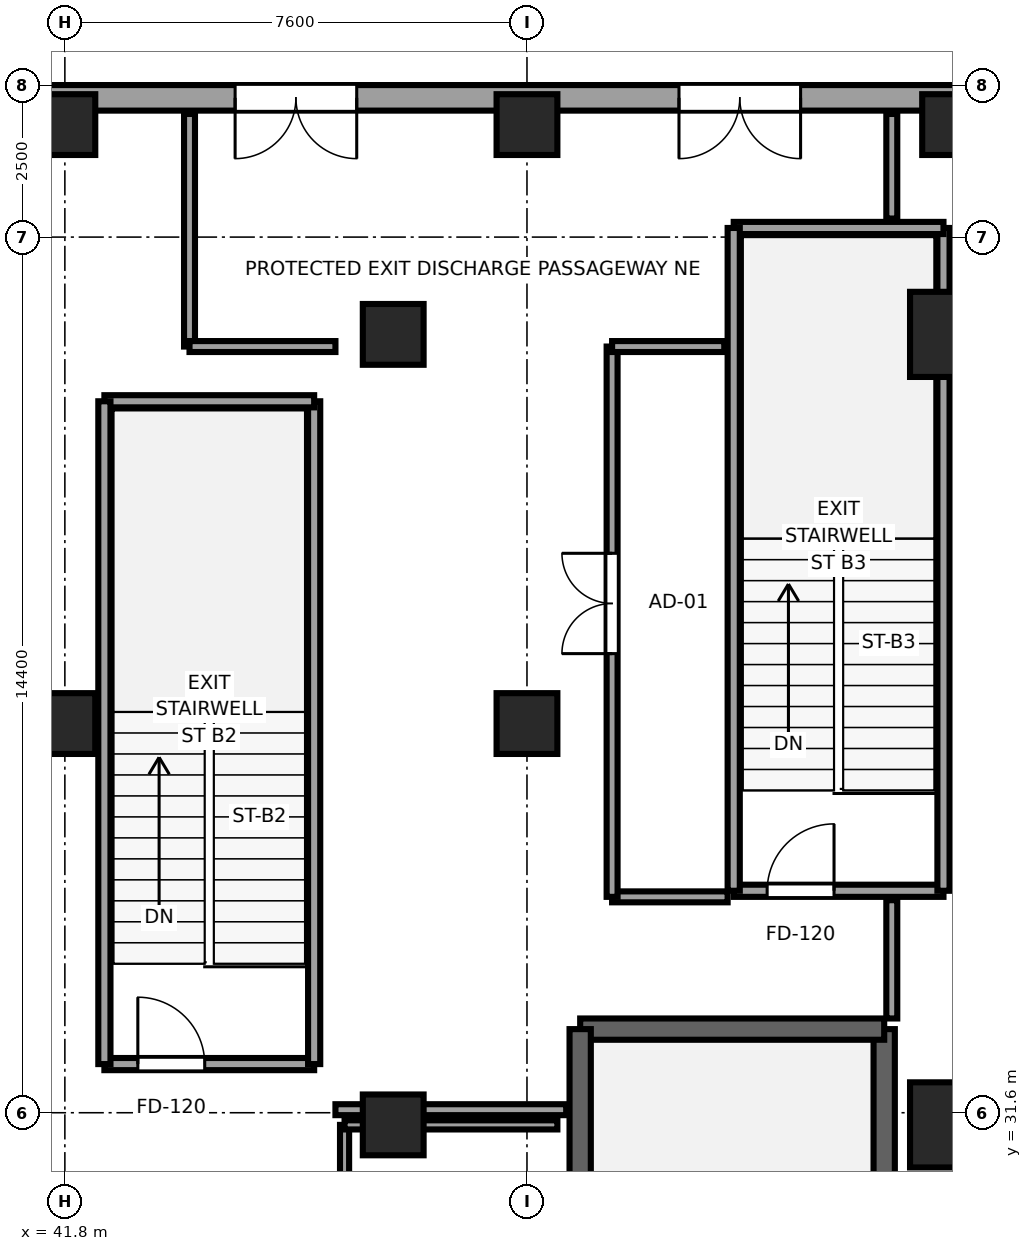
"""IFC4 building model, lengths in metres.
Left out: names, types, materials, properties, quantities, classifications, styles, units other than length and angle.
Written with IfcOpenShell. Run it as: python <this file> out.ifc"""

import sys

from ifc_helpers import new_model, si_unit, direction, frame, frame_2d, origin, origin_2d, place, context, subcontext, project, spatial, rectangle, extrude, source, transform, mapped, element, fill, save


model = new_model("IFC4")
c1 = context("Model", 3, precision=1e-05, world=origin(), true_north=direction((0.0, 1.0)))
c2 = subcontext(c1, "Body", "Model", "MODEL_VIEW")
j1 = project(units=[si_unit("LENGTHUNIT", "METRE"), si_unit("PLANEANGLEUNIT", "RADIAN")], contexts=[c1])
p1 = place(None, origin())
s1 = spatial("IfcSite", under=j1, at=p1, CompositionType="ELEMENT")
p2 = place(p1, origin())
s2 = spatial("IfcBuilding", under=s1, at=p2, CompositionType="ELEMENT")
p3 = place(p2, origin())
s3 = spatial("IfcBuildingStorey", under=s2, at=p3, CompositionType="ELEMENT", Elevation=0.0)
p4 = place(p3, frame((55.275, 20.025, 0.0), z_axis=(0.0, 0.0, 1.0), x_axis=(0.0, 1.0, 0.0)))
e1 = element("IfcWall", 1, at=p4, inside=s3, PredefinedType="SHEAR", context=c2, shape_type="SweptSolid", body=[
    extrude(rectangle(XDim=12.95, YDim=0.35, at=frame_2d((6.475, 0.0))), origin(), (0.0, 0.0, 1.0), 6.0),
])
p5 = place(p3, frame((55.275, 32.975, 0.0), z_axis=(0.0, 0.0, 1.0), x_axis=(-1.0, 0.0, 0.0)))
e2 = element("IfcWall", 2, at=p5, inside=s3, PredefinedType="SHEAR", context=c2, shape_type="SweptSolid", body=[
    extrude(rectangle(XDim=5.0, YDim=0.35, at=frame_2d((2.5, 0.0))), origin(), (0.0, 0.0, 1.0), 6.0),
])
p6 = place(p3, frame((50.275, 32.975, 0.0), z_axis=(0.0, 0.0, 1.0), x_axis=(0.0, -1.0, 0.0)))
e3 = element("IfcWall", 3, at=p6, inside=s3, PredefinedType="SHEAR", context=c2, shape_type="SweptSolid", body=[
    extrude(rectangle(XDim=12.95, YDim=0.35, at=frame_2d((6.475, 0.0))), origin(), (0.0, 0.0, 1.0), 6.0),
])
m1 = source(origin(), c2, "Body", "SweptSolid", [
    extrude(rectangle(XDim=1.0, YDim=1.0, at=origin_2d()), origin(), (0.0, 0.0, 1.0), 6.0),
])
p7 = place(p3, frame((47.2, 31.4, 0.0), z_axis=(0.0, 0.0, 1.0), x_axis=(1.0, 0.0, 0.0)))
e4 = element("IfcColumn", 4, at=p7, inside=s3, PredefinedType="COLUMN", context=c2, shape_type="MappedRepresentation", body=[
    mapped(m1, transform((0.0, 0.0, 0.0), x_axis=(1.0, 0.0, 0.0), y_axis=(0.0, 1.0, 0.0), z_axis=(0.0, 0.0, 1.0), scale=1.0)),
])
m2 = source(origin(), c2, "Body", "SweptSolid", [
    extrude(rectangle(XDim=1.4, YDim=1.4, at=origin_2d()), origin(), (0.0, 0.0, 1.0), 6.0),
])
p8 = place(p3, frame((56.4, 31.4, 0.0), z_axis=(0.0, 0.0, 1.0), x_axis=(1.0, 0.0, 0.0)))
e5 = element("IfcColumn", 5, at=p8, inside=s3, PredefinedType="COLUMN", context=c2, shape_type="MappedRepresentation", body=[
    mapped(m2, transform((0.0, 0.0, 0.0), x_axis=(1.0, 0.0, 0.0), y_axis=(0.0, 1.0, 0.0), z_axis=(0.0, 0.0, 1.0), scale=1.0)),
])
p9 = place(p3, frame((47.2, 44.4, 0.0), z_axis=(0.0, 0.0, 1.0), x_axis=(1.0, 0.0, 0.0)))
e6 = element("IfcColumn", 6, at=p9, inside=s3, PredefinedType="COLUMN", context=c2, shape_type="MappedRepresentation", body=[
    mapped(m1, transform((0.0, 0.0, 0.0), x_axis=(1.0, 0.0, 0.0), y_axis=(0.0, 1.0, 0.0), z_axis=(0.0, 0.0, 1.0), scale=1.0)),
])
p10 = place(p3, frame((56.4, 44.4, 0.0), z_axis=(0.0, 0.0, 1.0), x_axis=(1.0, 0.0, 0.0)))
e7 = element("IfcColumn", 7, at=p10, inside=s3, PredefinedType="COLUMN", context=c2, shape_type="MappedRepresentation", body=[
    mapped(m2, transform((0.0, 0.0, 0.0), x_axis=(1.0, 0.0, 0.0), y_axis=(0.0, 1.0, 0.0), z_axis=(0.0, 0.0, 1.0), scale=1.0)),
])
for number, where, z_axis, x_axis in (
    (8, (41.8, 47.85, 0.0), (0.0, 0.0, 1.0), (1.0, 0.0, 0.0)),
    (9, (49.4, 47.85, 0.0), (0.0, 0.0, 1.0), (1.0, 0.0, 0.0)),
    (10, (56.4, 47.85, 0.0), (0.0, 0.0, 1.0), (1.0, 0.0, 0.0)),
    (11, (41.8, 38.0, 0.0), (0.0, 0.0, 1.0), (1.0, 0.0, 0.0)),
    (12, (49.4, 38.0, 0.0), (0.0, 0.0, 1.0), (1.0, 0.0, 0.0)),
):
    element("IfcColumn", number, at=place(p3, frame(where, z_axis=z_axis, x_axis=x_axis)), inside=s3, PredefinedType="COLUMN", context=c2, shape_type="MappedRepresentation", body=[
        mapped(m1, transform((0.0, 0.0, 0.0), x_axis=(1.0, 0.0, 0.0), y_axis=(0.0, 1.0, 0.0), z_axis=(0.0, 0.0, 1.0), scale=1.0)),
    ])
p11 = place(p3, frame((65.19, 48.29, 0.0), z_axis=(0.0, 0.0, 1.0), x_axis=(-1.0, 0.0, 0.0)))
e13 = element("IfcWall", 13, at=p11, inside=s3, PredefinedType="SOLIDWALL", context=c2, shape_type="SweptSolid", body=[
    extrude(rectangle(XDim=73.38, YDim=0.42, at=frame_2d((36.69, 0.0))), origin(), (0.0, 0.0, 1.0), 5.74),
])
p12 = place(p11, frame((7.84, 0.0, 0.0), z_axis=(0.0, 0.0, 1.0), x_axis=(-1.0, 0.0, 0.0)))
e14 = element("IfcOpeningElement", 14, at=p12, cuts=e13, PredefinedType="OPENING", context=c2, shape_type="SweptSolid", body=[
    extrude(rectangle(XDim=6.4, YDim=3.2, at=frame_2d((3.2, 1.6))), frame((0.0, 0.22, 0.0), z_axis=(0.0, -1.0, 0.0), x_axis=(1.0, 0.0, 0.0)), (0.0, 0.0, 1.0), 0.44),
])
p13 = place(p11, frame((13.29, 0.0, 0.0), z_axis=(0.0, 0.0, 1.0), x_axis=(-1.0, 0.0, 0.0)))
e15 = element("IfcOpeningElement", 15, at=p13, cuts=e13, PredefinedType="OPENING", context=c2, shape_type="SweptSolid", body=[
    extrude(rectangle(XDim=2.0, YDim=2.25, at=frame_2d((1.0, 1.125))), frame((0.0, 0.22, 0.0), z_axis=(0.0, -1.0, 0.0), x_axis=(1.0, 0.0, 0.0)), (0.0, 0.0, 1.0), 0.44),
])
p14 = place(p11, frame((20.59, 0.0, 0.0), z_axis=(0.0, 0.0, 1.0), x_axis=(-1.0, 0.0, 0.0)))
e16 = element("IfcOpeningElement", 16, at=p14, cuts=e13, PredefinedType="OPENING", context=c2, shape_type="SweptSolid", body=[
    extrude(rectangle(XDim=2.0, YDim=2.25, at=frame_2d((1.0, 1.125))), frame((0.0, 0.22, 0.0), z_axis=(0.0, -1.0, 0.0), x_axis=(1.0, 0.0, 0.0)), (0.0, 0.0, 1.0), 0.44),
])
p15 = place(p11, frame((51.99, 0.0, 0.0), z_axis=(0.0, 0.0, 1.0), x_axis=(-1.0, 0.0, 0.0)))
e17 = element("IfcOpeningElement", 17, at=p15, cuts=e13, PredefinedType="OPENING", context=c2, shape_type="SweptSolid", body=[
    extrude(rectangle(XDim=2.0, YDim=2.25, at=frame_2d((1.0, 1.125))), frame((0.0, 0.22, 0.0), z_axis=(0.0, -1.0, 0.0), x_axis=(1.0, 0.0, 0.0)), (0.0, 0.0, 1.0), 0.44),
])
p16 = place(p11, frame((69.99, 0.0, 0.0), z_axis=(0.0, 0.0, 1.0), x_axis=(-1.0, 0.0, 0.0)))
e18 = element("IfcOpeningElement", 18, at=p16, cuts=e13, PredefinedType="OPENING", context=c2, shape_type="SweptSolid", body=[
    extrude(rectangle(XDim=2.0, YDim=2.25, at=frame_2d((1.0, 1.125))), frame((0.0, 0.22, 0.0), z_axis=(0.0, -1.0, 0.0), x_axis=(1.0, 0.0, 0.0)), (0.0, 0.0, 1.0), 0.44),
])
p17 = place(p11, frame((24.462, 0.0, 0.65)))
e19 = element("IfcOpeningElement", 19, at=p17, cuts=e13, PredefinedType="OPENING", context=c2, shape_type="SweptSolid", body=[
    extrude(rectangle(XDim=3.0, YDim=2.5, at=frame_2d((1.5, 1.25))), frame((0.0, 0.22, 0.0), z_axis=(0.0, -1.0, 0.0), x_axis=(1.0, 0.0, 0.0)), (0.0, 0.0, 1.0), 0.44),
])
p18 = place(p11, frame((28.423, 0.0, 0.65)))
e20 = element("IfcOpeningElement", 20, at=p18, cuts=e13, PredefinedType="OPENING", context=c2, shape_type="SweptSolid", body=[
    extrude(rectangle(XDim=3.0, YDim=2.5, at=frame_2d((1.5, 1.25))), frame((0.0, 0.22, 0.0), z_axis=(0.0, -1.0, 0.0), x_axis=(1.0, 0.0, 0.0)), (0.0, 0.0, 1.0), 0.44),
])
p19 = place(p11, frame((32.934, 0.0, 0.65)))
e21 = element("IfcOpeningElement", 21, at=p19, cuts=e13, PredefinedType="OPENING", context=c2, shape_type="SweptSolid", body=[
    extrude(rectangle(XDim=3.0, YDim=2.5, at=frame_2d((1.5, 1.25))), frame((0.0, 0.22, 0.0), z_axis=(0.0, -1.0, 0.0), x_axis=(1.0, 0.0, 0.0)), (0.0, 0.0, 1.0), 0.44),
])
p20 = place(p11, frame((37.446, 0.0, 0.65)))
e22 = element("IfcOpeningElement", 22, at=p20, cuts=e13, PredefinedType="OPENING", context=c2, shape_type="SweptSolid", body=[
    extrude(rectangle(XDim=3.0, YDim=2.5, at=frame_2d((1.5, 1.25))), frame((0.0, 0.22, 0.0), z_axis=(0.0, -1.0, 0.0), x_axis=(1.0, 0.0, 0.0)), (0.0, 0.0, 1.0), 0.44),
])
p21 = place(p11, frame((41.957, 0.0, 0.65)))
e23 = element("IfcOpeningElement", 23, at=p21, cuts=e13, PredefinedType="OPENING", context=c2, shape_type="SweptSolid", body=[
    extrude(rectangle(XDim=3.0, YDim=2.5, at=frame_2d((1.5, 1.25))), frame((0.0, 0.22, 0.0), z_axis=(0.0, -1.0, 0.0), x_axis=(1.0, 0.0, 0.0)), (0.0, 0.0, 1.0), 0.44),
])
p22 = place(p3, frame((42.45, 32.4, 0.0), z_axis=(0.0, 0.0, 1.0), x_axis=(1.0, 0.0, 0.0)))
e24 = element("IfcWall", 24, at=p22, inside=s3, PredefinedType="SOLIDWALL", context=c2, shape_type="SweptSolid", body=[
    extrude(rectangle(XDim=3.45, YDim=0.2, at=frame_2d((1.725, 0.0))), origin(), (0.0, 0.0, 1.0), 5.74),
])
p23 = place(p22, frame((1.65, 0.0, 0.0), z_axis=(0.0, 0.0, 1.0), x_axis=(-1.0, 0.0, 0.0)))
e25 = element("IfcOpeningElement", 25, at=p23, cuts=e24, PredefinedType="OPENING", context=c2, shape_type="SweptSolid", body=[
    extrude(rectangle(XDim=1.1, YDim=2.12, at=frame_2d((0.55, 1.06))), frame((0.0, 0.11, 0.0), z_axis=(0.0, -1.0, 0.0), x_axis=(1.0, 0.0, 0.0)), (0.0, 0.0, 1.0), 0.22),
])
p24 = place(p3, frame((45.9, 32.4, 0.0), z_axis=(0.0, 0.0, 1.0), x_axis=(0.0, 1.0, 0.0)))
e26 = element("IfcWall", 26, at=p24, inside=s3, PredefinedType="SOLIDWALL", context=c2, shape_type="SweptSolid", body=[
    extrude(rectangle(XDim=10.9, YDim=0.2, at=frame_2d((5.45, 0.0))), origin(), (0.0, 0.0, 1.0), 5.74),
])
p25 = place(p3, frame((45.9, 43.3, 0.0), z_axis=(0.0, 0.0, 1.0), x_axis=(-1.0, 0.0, 0.0)))
e27 = element("IfcWall", 27, at=p25, inside=s3, PredefinedType="SOLIDWALL", context=c2, shape_type="SweptSolid", body=[
    extrude(rectangle(XDim=3.45, YDim=0.2, at=frame_2d((1.725, 0.0))), origin(), (0.0, 0.0, 1.0), 5.74),
])
p26 = place(p3, frame((42.45, 43.3, 0.0), z_axis=(0.0, 0.0, 1.0), x_axis=(0.0, -1.0, 0.0)))
e28 = element("IfcWall", 28, at=p26, inside=s3, PredefinedType="SOLIDWALL", context=c2, shape_type="SweptSolid", body=[
    extrude(rectangle(XDim=10.9, YDim=0.2, at=frame_2d((5.45, 0.0))), origin(), (0.0, 0.0, 1.0), 5.74),
])
p27 = place(p3, frame((52.8, 35.25, 0.0), z_axis=(0.0, 0.0, 1.0), x_axis=(1.0, 0.0, 0.0)))
e29 = element("IfcWall", 29, at=p27, inside=s3, PredefinedType="SOLIDWALL", context=c2, shape_type="SweptSolid", body=[
    extrude(rectangle(XDim=3.45, YDim=0.2, at=frame_2d((1.725, 0.0))), origin(), (0.0, 0.0, 1.0), 5.74),
])
p28 = place(p27, frame((1.65, 0.0, 0.0), z_axis=(0.0, 0.0, 1.0), x_axis=(-1.0, 0.0, 0.0)))
e30 = element("IfcOpeningElement", 30, at=p28, cuts=e29, PredefinedType="OPENING", context=c2, shape_type="SweptSolid", body=[
    extrude(rectangle(XDim=1.1, YDim=2.12, at=frame_2d((0.55, 1.06))), frame((0.0, 0.11, 0.0), z_axis=(0.0, -1.0, 0.0), x_axis=(1.0, 0.0, 0.0)), (0.0, 0.0, 1.0), 0.22),
])
p29 = place(p3, frame((56.25, 35.25, 0.0), z_axis=(0.0, 0.0, 1.0), x_axis=(0.0, 1.0, 0.0)))
e31 = element("IfcWall", 31, at=p29, inside=s3, PredefinedType="SOLIDWALL", context=c2, shape_type="SweptSolid", body=[
    extrude(rectangle(XDim=10.9, YDim=0.2, at=frame_2d((5.45, 0.0))), origin(), (0.0, 0.0, 1.0), 4.914),
])
p30 = place(p3, frame((56.25, 46.15, 0.0), z_axis=(0.0, 0.0, 1.0), x_axis=(-1.0, 0.0, 0.0)))
e32 = element("IfcWall", 32, at=p30, inside=s3, PredefinedType="SOLIDWALL", context=c2, shape_type="SweptSolid", body=[
    extrude(rectangle(XDim=3.45, YDim=0.2, at=frame_2d((1.725, 0.0))), origin(), (0.0, 0.0, 1.0), 5.74),
])
p31 = place(p3, frame((52.8, 46.15, 0.0), z_axis=(0.0, 0.0, 1.0), x_axis=(0.0, -1.0, 0.0)))
e33 = element("IfcWall", 33, at=p31, inside=s3, PredefinedType="SOLIDWALL", context=c2, shape_type="SweptSolid", body=[
    extrude(rectangle(XDim=10.9, YDim=0.2, at=frame_2d((5.45, 0.0))), origin(), (0.0, 0.0, 1.0), 5.74),
])
p32 = place(p3, frame((46.25, 31.65, 0.0), z_axis=(0.0, 0.0, 1.0), x_axis=(1.0, 0.0, 0.0)))
e34 = element("IfcWall", 34, at=p32, inside=s3, PredefinedType="PARTITIONING", context=c2, shape_type="SweptSolid", body=[
    extrude(rectangle(XDim=3.795, YDim=0.18, at=frame_2d((1.897, 0.0))), origin(), (0.0, 0.0, 1.0), 5.74),
])
p33 = place(p3, frame((55.4, 33.15, 0.0), z_axis=(0.0, 0.0, 1.0), x_axis=(0.0, 1.0, 0.0)))
e35 = element("IfcWall", 35, at=p33, inside=s3, PredefinedType="PARTITIONING", context=c2, shape_type="SweptSolid", body=[
    extrude(rectangle(XDim=1.945, YDim=0.18, at=frame_2d((0.973, 0.0))), origin(), (0.0, 0.0, 1.0), 5.74),
])
p34 = place(p3, frame((50.8, 35.15, 0.0), z_axis=(0.0, 0.0, 1.0), x_axis=(1.0, 0.0, 0.0)))
e36 = element("IfcWall", 36, at=p34, inside=s3, PredefinedType="PARTITIONING", context=c2, shape_type="SweptSolid", body=[
    extrude(rectangle(XDim=1.9, YDim=0.18, at=frame_2d((0.95, 0.0))), origin(), (0.0, 0.0, 1.0), 5.74),
])
p35 = place(p3, frame((50.8, 35.15, 0.0), z_axis=(0.0, 0.0, 1.0), x_axis=(0.0, 1.0, 0.0)))
e37 = element("IfcWall", 37, at=p35, inside=s3, PredefinedType="PARTITIONING", context=c2, shape_type="SweptSolid", body=[
    extrude(rectangle(XDim=9.05, YDim=0.18, at=frame_2d((4.525, 0.0))), origin(), (0.0, 0.0, 1.0), 5.74),
])
p36 = place(p35, frame((4.0, 0.0, 0.0)))
e38 = element("IfcOpeningElement", 38, at=p36, cuts=e37, PredefinedType="OPENING", context=c2, shape_type="SweptSolid", body=[
    extrude(rectangle(XDim=1.65, YDim=2.15, at=frame_2d((0.825, 1.075))), frame((0.0, 0.1, 0.0), z_axis=(0.0, -1.0, 0.0), x_axis=(1.0, 0.0, 0.0)), (0.0, 0.0, 1.0), 0.2),
])
p37 = place(p3, frame((50.8, 44.2, 0.0), z_axis=(0.0, 0.0, 1.0), x_axis=(1.0, 0.0, 0.0)))
e39 = element("IfcWall", 39, at=p37, inside=s3, PredefinedType="PARTITIONING", context=c2, shape_type="SweptSolid", body=[
    extrude(rectangle(XDim=1.845, YDim=0.18, at=frame_2d((0.922, 0.0))), origin(), (0.0, 0.0, 1.0), 4.914),
])
p38 = place(p3, frame((55.4, 46.305, 0.0), z_axis=(0.0, 0.0, 1.0), x_axis=(0.0, 1.0, 0.0)))
e40 = element("IfcWall", 40, at=p38, inside=s3, PredefinedType="PARTITIONING", context=c2, shape_type="SweptSolid", body=[
    extrude(rectangle(XDim=1.72, YDim=0.18, at=frame_2d((0.86, 0.0))), origin(), (0.0, 0.0, 1.0), 5.74),
])
p39 = place(p3, frame((43.85, 44.2, 0.0), z_axis=(0.0, 0.0, 1.0), x_axis=(0.0, 1.0, 0.0)))
e41 = element("IfcWall", 41, at=p39, inside=s3, PredefinedType="PARTITIONING", context=c2, shape_type="SweptSolid", body=[
    extrude(rectangle(XDim=3.825, YDim=0.18, at=frame_2d((1.913, 0.0))), origin(), (0.0, 0.0, 1.0), 5.74),
])
p40 = place(p3, frame((43.85, 44.2, 0.0), z_axis=(0.0, 0.0, 1.0), x_axis=(1.0, 0.0, 0.0)))
e42 = element("IfcWall", 42, at=p40, inside=s3, PredefinedType="PARTITIONING", context=c2, shape_type="SweptSolid", body=[
    extrude(rectangle(XDim=2.4, YDim=0.18, at=frame_2d((1.2, 0.0))), origin(), (0.0, 0.0, 1.0), 5.74),
])
p41 = place(p3, frame((46.4, 26.2, 0.0), z_axis=(0.0, 0.0, 1.0), x_axis=(0.0, 1.0, 0.0)))
e43 = element("IfcWall", 43, at=p41, inside=s3, PredefinedType="PARTITIONING", context=c2, shape_type="SweptSolid", body=[
    extrude(rectangle(XDim=5.2, YDim=0.15, at=frame_2d((2.6, 0.0))), origin(), (0.0, 0.0, 1.0), 5.74),
])
p42 = place(p41, frame((0.825, 0.0, 0.0)))
e44 = element("IfcOpeningElement", 44, at=p42, cuts=e43, PredefinedType="OPENING", context=c2, shape_type="SweptSolid", body=[
    extrude(rectangle(XDim=1.35, YDim=2.15, at=frame_2d((0.675, 1.075))), frame((0.0, 0.085, 0.0), z_axis=(0.0, -1.0, 0.0), x_axis=(1.0, 0.0, 0.0)), (0.0, 0.0, 1.0), 0.17),
])
p43 = place(p3, frame((46.4, 31.4, 0.0), z_axis=(0.0, 0.0, 1.0), x_axis=(1.0, 0.0, 0.0)))
e45 = element("IfcWall", 45, at=p43, inside=s3, PredefinedType="PARTITIONING", context=c2, shape_type="SweptSolid", body=[
    extrude(rectangle(XDim=3.5, YDim=0.15, at=frame_2d((1.75, 0.0))), origin(), (0.0, 0.0, 1.0), 4.914),
])
m3 = source(origin(), c2, "Body", "SweptSolid", [
    extrude(rectangle(XDim=2.0, YDim=2.25, at=frame_2d((1.0, 1.125))), frame((0.0, 0.025, 0.0), z_axis=(0.0, -1.0, 0.0), x_axis=(1.0, 0.0, 0.0)), (0.0, 0.0, 1.0), 0.05),
])
p44 = place(p13, origin())
e46 = element("IfcDoor", 46, at=p44, inside=s3, OperationType="DOUBLE_DOOR_SINGLE_SWING", PredefinedType="DOOR", context=c2, shape_type="MappedRepresentation", body=[
    mapped(m3, transform((0.0, 0.0, 0.0), x_axis=(1.0, 0.0, 0.0), y_axis=(0.0, 1.0, 0.0), z_axis=(0.0, 0.0, 1.0), scale=1.0)),
])
fill(e15, e46)
p45 = place(p14, origin())
e47 = element("IfcDoor", 47, at=p45, inside=s3, OperationType="DOUBLE_DOOR_SINGLE_SWING", PredefinedType="DOOR", context=c2, shape_type="MappedRepresentation", body=[
    mapped(m3, transform((0.0, 0.0, 0.0), x_axis=(1.0, 0.0, 0.0), y_axis=(0.0, 1.0, 0.0), z_axis=(0.0, 0.0, 1.0), scale=1.0)),
])
fill(e16, e47)
m4 = source(origin(), c2, "Body", "SweptSolid", [
    extrude(rectangle(XDim=1.1, YDim=2.12, at=frame_2d((0.55, 1.06))), frame((0.0, 0.025, 0.0), z_axis=(0.0, -1.0, 0.0), x_axis=(1.0, 0.0, 0.0)), (0.0, 0.0, 1.0), 0.05),
])
p46 = place(p23, origin())
e48 = element("IfcDoor", 48, at=p46, inside=s3, OperationType="SINGLE_SWING_LEFT", PredefinedType="DOOR", context=c2, shape_type="MappedRepresentation", body=[
    mapped(m4, transform((0.0, 0.0, 0.0), x_axis=(1.0, 0.0, 0.0), y_axis=(0.0, 1.0, 0.0), z_axis=(0.0, 0.0, 1.0), scale=1.0)),
])
fill(e25, e48)
p47 = place(p28, origin())
e49 = element("IfcDoor", 49, at=p47, inside=s3, OperationType="SINGLE_SWING_RIGHT", PredefinedType="DOOR", context=c2, shape_type="MappedRepresentation", body=[
    mapped(m4, transform((0.0, 0.0, 0.0), x_axis=(1.0, 0.0, 0.0), y_axis=(0.0, 1.0, 0.0), z_axis=(0.0, 0.0, 1.0), scale=1.0)),
])
fill(e30, e49)
m5 = source(origin(), c2, "Body", "SweptSolid", [
    extrude(rectangle(XDim=1.65, YDim=2.15, at=frame_2d((0.825, 1.075))), frame((0.0, 0.025, 0.0), z_axis=(0.0, -1.0, 0.0), x_axis=(1.0, 0.0, 0.0)), (0.0, 0.0, 1.0), 0.05),
])
p48 = place(p36, origin())
e50 = element("IfcDoor", 50, at=p48, inside=s3, OperationType="DOUBLE_DOOR_SINGLE_SWING", PredefinedType="DOOR", context=c2, shape_type="MappedRepresentation", body=[
    mapped(m5, transform((0.0, 0.0, 0.0), x_axis=(1.0, 0.0, 0.0), y_axis=(0.0, 1.0, 0.0), z_axis=(0.0, 0.0, 1.0), scale=1.0)),
])
fill(e38, e50)
save(model, sys.argv[1])
